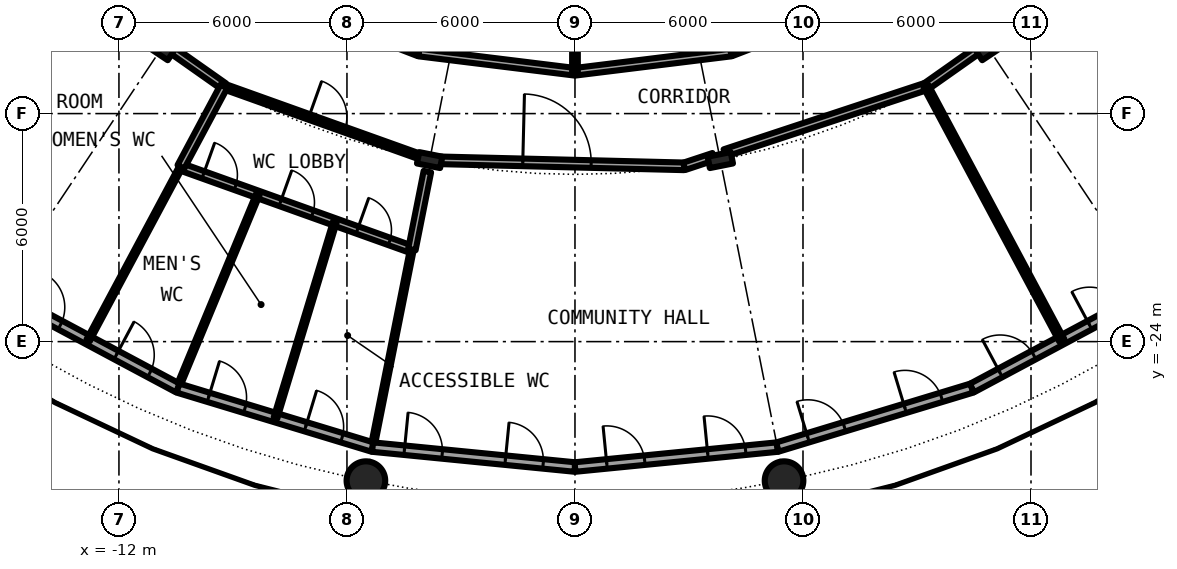
"""IFC4 building model, lengths in metres.
Left out: names, types, materials, properties, quantities, classifications, styles, units other than length and angle.
Written with IfcOpenShell. Run it as: python <this file> out.ifc"""

import sys

from ifc_helpers import new_model, si_unit, direction, frame, frame_2d, origin, origin_2d, place, context, subcontext, project, spatial, rectangle, hollow_circle, i_section, extrude, element, fill, save


model = new_model("IFC4")
c1 = context("Model", 3, precision=1e-05, world=origin(), true_north=direction((0.0, 1.0)))
c2 = subcontext(c1, "Body", "Model", "MODEL_VIEW")
j1 = project(units=[si_unit("LENGTHUNIT", "METRE"), si_unit("PLANEANGLEUNIT", "RADIAN")], contexts=[c1])
p1 = place(None, origin())
s1 = spatial("IfcSite", under=j1, at=p1, CompositionType="ELEMENT")
p2 = place(p1, origin())
s2 = spatial("IfcBuilding", under=s1, at=p2, CompositionType="ELEMENT")
p3 = place(p2, frame((0.0, 0.0, 53.3)))
s3 = spatial("IfcBuildingStorey", under=s2, at=p3, CompositionType="ELEMENT", Elevation=53.3)
for number, where, z_axis, x_axis in (
    (1, (-5.501, -27.658, 0.0), (0.0, 0.0, 1.0), (1.0, 0.0, 0.0)),
    (2, (5.501, -27.658, 0.0), (0.0, 0.0, 1.0), (1.0, 0.0, 0.0)),
):
    element("IfcColumn", number, at=place(p3, frame(where, z_axis=z_axis, x_axis=x_axis)), inside=s3, PredefinedType="COLUMN", context=c2, shape_type="SweptSolid", body=[
        extrude(hollow_circle(Radius=0.508, WallThickness=0.05, at=origin_2d()), origin(), (0.0, 0.0, 1.0), 4.2),
    ])
for number, where, z_axis, x_axis in (
    (3, (-10.889, -16.297, 0.0), (0.0, 0.0, 1.0), (-0.556, -0.831, 0.0)),
    (4, (-3.824, -19.223, 0.0), (0.0, 0.0, 1.0), (-0.195, -0.981, 0.0)),
    (5, (3.824, -19.223, 0.0), (0.0, 0.0, 1.0), (0.195, -0.981, 0.0)),
    (6, (10.889, -16.297, 0.0), (0.0, 0.0, 1.0), (0.556, -0.831, 0.0)),
):
    element("IfcColumn", number, at=place(p3, frame(where, z_axis=z_axis, x_axis=x_axis)), inside=s3, PredefinedType="COLUMN", context=c2, shape_type="SweptSolid", body=[
        extrude(i_section(OverallWidth=0.305, OverallDepth=0.62, WebThickness=0.021, FlangeThickness=0.04, FilletRadius=0.027, at=origin_2d()), origin(), (0.0, 0.0, 1.0), 4.2),
    ])
p4 = place(p3, frame((-15.167, -22.699, 0.0), z_axis=(0.0, 0.0, 1.0), x_axis=(0.881915646801, -0.471407246368, 0.0)))
e7 = element("IfcWall", 7, at=p4, inside=s3, PredefinedType="SOLIDWALL", context=c2, shape_type="SweptSolid", body=[
    extrude(rectangle(XDim=5.352, YDim=0.25, at=frame_2d((2.676, 0.0))), origin(), (0.0, 0.0, 1.0), 3.8),
])
p5 = place(p4, frame((0.841, 0.0, 0.0)))
e8 = element("IfcOpeningElement", 8, at=p5, cuts=e7, PredefinedType="OPENING", context=c2, shape_type="SweptSolid", body=[
    extrude(rectangle(XDim=1.0, YDim=2.2, at=frame_2d((0.5, 1.1))), frame((0.0, 0.135, 0.0), z_axis=(0.0, -1.0, 0.0), x_axis=(1.0, 0.0, 0.0)), (0.0, 0.0, 1.0), 0.27),
])
p6 = place(p4, frame((3.51, 0.0, 0.0)))
e9 = element("IfcOpeningElement", 9, at=p6, cuts=e7, PredefinedType="OPENING", context=c2, shape_type="SweptSolid", body=[
    extrude(rectangle(XDim=1.0, YDim=2.2, at=frame_2d((0.5, 1.1))), frame((0.0, 0.135, 0.0), z_axis=(0.0, -1.0, 0.0), x_axis=(1.0, 0.0, 0.0)), (0.0, 0.0, 1.0), 0.27),
])
p7 = place(p3, frame((-10.447, -25.222, 0.0), z_axis=(0.0, 0.0, 1.0), x_axis=(0.956965678721, -0.290201119486, 0.0)))
e10 = element("IfcWall", 10, at=p7, inside=s3, PredefinedType="SOLIDWALL", context=c2, shape_type="SweptSolid", body=[
    extrude(rectangle(XDim=5.351, YDim=0.25, at=frame_2d((2.676, 0.0))), origin(), (0.0, 0.0, 1.0), 3.8),
])
p8 = place(p7, frame((0.841, 0.0, 0.0)))
e11 = element("IfcOpeningElement", 11, at=p8, cuts=e10, PredefinedType="OPENING", context=c2, shape_type="SweptSolid", body=[
    extrude(rectangle(XDim=1.0, YDim=2.2, at=frame_2d((0.5, 1.1))), frame((0.0, 0.135, 0.0), z_axis=(0.0, -1.0, 0.0), x_axis=(1.0, 0.0, 0.0)), (0.0, 0.0, 1.0), 0.27),
])
p9 = place(p7, frame((3.51, 0.0, 0.0)))
e12 = element("IfcOpeningElement", 12, at=p9, cuts=e10, PredefinedType="OPENING", context=c2, shape_type="SweptSolid", body=[
    extrude(rectangle(XDim=1.0, YDim=2.2, at=frame_2d((0.5, 1.1))), frame((0.0, 0.135, 0.0), z_axis=(0.0, -1.0, 0.0), x_axis=(1.0, 0.0, 0.0)), (0.0, 0.0, 1.0), 0.27),
])
p10 = place(p3, frame((-5.326, -26.775, 0.0), z_axis=(0.0, 0.0, 1.0), x_axis=(0.995173996315, -0.098126026407, 0.0)))
e13 = element("IfcWall", 13, at=p10, inside=s3, PredefinedType="SOLIDWALL", context=c2, shape_type="SweptSolid", body=[
    extrude(rectangle(XDim=5.352, YDim=0.25, at=frame_2d((2.676, 0.0))), origin(), (0.0, 0.0, 1.0), 3.8),
])
p11 = place(p10, frame((0.841, 0.0, 0.0)))
e14 = element("IfcOpeningElement", 14, at=p11, cuts=e13, PredefinedType="OPENING", context=c2, shape_type="SweptSolid", body=[
    extrude(rectangle(XDim=1.0, YDim=2.2, at=frame_2d((0.5, 1.1))), frame((0.0, 0.135, 0.0), z_axis=(0.0, -1.0, 0.0), x_axis=(1.0, 0.0, 0.0)), (0.0, 0.0, 1.0), 0.27),
])
p12 = place(p10, frame((3.51, 0.0, 0.0)))
e15 = element("IfcOpeningElement", 15, at=p12, cuts=e13, PredefinedType="OPENING", context=c2, shape_type="SweptSolid", body=[
    extrude(rectangle(XDim=1.0, YDim=2.2, at=frame_2d((0.5, 1.1))), frame((0.0, 0.135, 0.0), z_axis=(0.0, -1.0, 0.0), x_axis=(1.0, 0.0, 0.0)), (0.0, 0.0, 1.0), 0.27),
])
p13 = place(p3, frame((0.0, -27.3, 0.0), z_axis=(0.0, 0.0, 1.0), x_axis=(0.995173996315, 0.098126026407, 0.0)))
e16 = element("IfcWall", 16, at=p13, inside=s3, PredefinedType="SOLIDWALL", context=c2, shape_type="SweptSolid", body=[
    extrude(rectangle(XDim=5.352, YDim=0.25, at=frame_2d((2.676, 0.0))), origin(), (0.0, 0.0, 1.0), 3.8),
])
p14 = place(p13, frame((0.841, 0.0, 0.0)))
e17 = element("IfcOpeningElement", 17, at=p14, cuts=e16, PredefinedType="OPENING", context=c2, shape_type="SweptSolid", body=[
    extrude(rectangle(XDim=1.0, YDim=2.2, at=frame_2d((0.5, 1.1))), frame((0.0, 0.135, 0.0), z_axis=(0.0, -1.0, 0.0), x_axis=(1.0, 0.0, 0.0)), (0.0, 0.0, 1.0), 0.27),
])
p15 = place(p13, frame((3.51, 0.0, 0.0)))
e18 = element("IfcOpeningElement", 18, at=p15, cuts=e16, PredefinedType="OPENING", context=c2, shape_type="SweptSolid", body=[
    extrude(rectangle(XDim=1.0, YDim=2.2, at=frame_2d((0.5, 1.1))), frame((0.0, 0.135, 0.0), z_axis=(0.0, -1.0, 0.0), x_axis=(1.0, 0.0, 0.0)), (0.0, 0.0, 1.0), 0.27),
])
p16 = place(p3, frame((5.326, -26.775, 0.0), z_axis=(0.0, 0.0, 1.0), x_axis=(0.956965678721, 0.290201119486, 0.0)))
e19 = element("IfcWall", 19, at=p16, inside=s3, PredefinedType="SOLIDWALL", context=c2, shape_type="SweptSolid", body=[
    extrude(rectangle(XDim=5.351, YDim=0.25, at=frame_2d((2.676, 0.0))), origin(), (0.0, 0.0, 1.0), 3.8),
])
p17 = place(p16, frame((0.841, 0.0, 0.0)))
e20 = element("IfcOpeningElement", 20, at=p17, cuts=e19, PredefinedType="OPENING", context=c2, shape_type="SweptSolid", body=[
    extrude(rectangle(XDim=1.0, YDim=2.2, at=frame_2d((0.5, 1.1))), frame((0.0, 0.135, 0.0), z_axis=(0.0, -1.0, 0.0), x_axis=(1.0, 0.0, 0.0)), (0.0, 0.0, 1.0), 0.27),
])
p18 = place(p16, frame((3.51, 0.0, 0.0)))
e21 = element("IfcOpeningElement", 21, at=p18, cuts=e19, PredefinedType="OPENING", context=c2, shape_type="SweptSolid", body=[
    extrude(rectangle(XDim=1.0, YDim=2.2, at=frame_2d((0.5, 1.1))), frame((0.0, 0.135, 0.0), z_axis=(0.0, -1.0, 0.0), x_axis=(1.0, 0.0, 0.0)), (0.0, 0.0, 1.0), 0.27),
])
p19 = place(p3, frame((10.447, -25.222, 0.0), z_axis=(0.0, 0.0, 1.0), x_axis=(0.881915646801, 0.471407246368, 0.0)))
e22 = element("IfcWall", 22, at=p19, inside=s3, PredefinedType="SOLIDWALL", context=c2, shape_type="SweptSolid", body=[
    extrude(rectangle(XDim=5.352, YDim=0.25, at=frame_2d((2.676, 0.0))), origin(), (0.0, 0.0, 1.0), 3.8),
])
p20 = place(p19, frame((0.841, 0.0, 0.0)))
e23 = element("IfcOpeningElement", 23, at=p20, cuts=e22, PredefinedType="OPENING", context=c2, shape_type="SweptSolid", body=[
    extrude(rectangle(XDim=1.0, YDim=2.2, at=frame_2d((0.5, 1.1))), frame((0.0, 0.135, 0.0), z_axis=(0.0, -1.0, 0.0), x_axis=(1.0, 0.0, 0.0)), (0.0, 0.0, 1.0), 0.27),
])
p21 = place(p19, frame((3.51, 0.0, 0.0)))
e24 = element("IfcOpeningElement", 24, at=p21, cuts=e22, PredefinedType="OPENING", context=c2, shape_type="SweptSolid", body=[
    extrude(rectangle(XDim=1.0, YDim=2.2, at=frame_2d((0.5, 1.1))), frame((0.0, 0.135, 0.0), z_axis=(0.0, -1.0, 0.0), x_axis=(1.0, 0.0, 0.0)), (0.0, 0.0, 1.0), 0.27),
])
p22 = place(p3, frame((-10.373, -19.401, 0.0), z_axis=(0.0, 0.0, 1.0), x_axis=(0.941534771306, -0.336915826909, 0.0)))
e25 = element("IfcWall", 25, at=p22, inside=s3, PredefinedType="PARTITIONING", context=c2, shape_type="SweptSolid", body=[
    extrude(rectangle(XDim=6.459, YDim=0.2, at=frame_2d((3.229, 0.0))), origin(), (0.0, 0.0, 1.0), 3.8),
])
p23 = place(p22, frame((0.627, 0.0, 0.0)))
e26 = element("IfcOpeningElement", 26, at=p23, cuts=e25, PredefinedType="OPENING", context=c2, shape_type="SweptSolid", body=[
    extrude(rectangle(XDim=0.9, YDim=2.3, at=frame_2d((0.45, 1.15))), frame((0.0, 0.11, 0.0), z_axis=(0.0, -1.0, 0.0), x_axis=(1.0, 0.0, 0.0)), (0.0, 0.0, 1.0), 0.22),
])
p24 = place(p22, frame((2.781, 0.0, 0.0)))
e27 = element("IfcOpeningElement", 27, at=p24, cuts=e25, PredefinedType="OPENING", context=c2, shape_type="SweptSolid", body=[
    extrude(rectangle(XDim=0.9, YDim=2.3, at=frame_2d((0.45, 1.15))), frame((0.0, 0.11, 0.0), z_axis=(0.0, -1.0, 0.0), x_axis=(1.0, 0.0, 0.0)), (0.0, 0.0, 1.0), 0.22),
])
p25 = place(p22, frame((4.933, 0.0, 0.0)))
e28 = element("IfcOpeningElement", 28, at=p25, cuts=e25, PredefinedType="OPENING", context=c2, shape_type="SweptSolid", body=[
    extrude(rectangle(XDim=0.9, YDim=2.3, at=frame_2d((0.45, 1.15))), frame((0.0, 0.11, 0.0), z_axis=(0.0, -1.0, 0.0), x_axis=(1.0, 0.0, 0.0)), (0.0, 0.0, 1.0), 0.22),
])
for number, where, z_axis, x_axis in (
    (29, (-10.686, -16.267, 0.0), (0.0, 0.0, 1.0), (0.818, -0.576, 0.0)),
    (30, (9.239, -17.286, 0.0), (0.0, 0.0, 1.0), (0.818, 0.576, 0.0)),
):
    element("IfcWall", number, at=place(p3, frame(where, z_axis=z_axis, x_axis=x_axis)), inside=s3, PredefinedType="PARTITIONING", context=c2, shape_type="SweptSolid", body=[
        extrude(rectangle(XDim=1.77, YDim=0.2, at=frame_2d((0.885, 0.0))), origin(), (0.0, 0.0, 1.0), 3.48),
    ])
p26 = place(p3, frame((-9.239, -17.286, 0.0), z_axis=(0.0, 0.0, 1.0), x_axis=(0.94157995483, -0.336789531699, 0.0)))
e31 = element("IfcWall", 31, at=p26, inside=s3, PredefinedType="PARTITIONING", context=c2, shape_type="SweptSolid", body=[
    extrude(rectangle(XDim=5.597, YDim=0.15, at=frame_2d((2.798, 0.0))), origin(), (0.0, 0.0, 1.0), 3.48),
])
p27 = place(p26, frame((2.376, 0.0, 0.0)))
e32 = element("IfcOpeningElement", 32, at=p27, cuts=e31, PredefinedType="OPENING", context=c2, shape_type="SweptSolid", body=[
    extrude(rectangle(XDim=1.0, YDim=2.3, at=frame_2d((0.5, 1.15))), frame((0.0, 0.085, 0.0), z_axis=(0.0, -1.0, 0.0), x_axis=(1.0, 0.0, 0.0)), (0.0, 0.0, 1.0), 0.17),
])
p28 = place(p3, frame((-3.669, -19.227, 0.0), z_axis=(0.0, 0.0, 1.0), x_axis=(0.999697994237, -0.024574790294, 0.0)))
e33 = element("IfcWall", 33, at=p28, inside=s3, PredefinedType="PARTITIONING", context=c2, shape_type="SweptSolid", body=[
    extrude(rectangle(XDim=6.547, YDim=0.2, at=frame_2d((3.273, 0.0))), origin(), (0.0, 0.0, 1.0), 3.48),
])
p29 = place(p28, frame((2.296, 0.0, 0.0)))
e34 = element("IfcOpeningElement", 34, at=p29, cuts=e33, PredefinedType="OPENING", context=c2, shape_type="SweptSolid", body=[
    extrude(rectangle(XDim=1.8, YDim=2.3, at=frame_2d((0.9, 1.15))), frame((0.0, 0.11, 0.0), z_axis=(0.0, -1.0, 0.0), x_axis=(1.0, 0.0, 0.0)), (0.0, 0.0, 1.0), 0.22),
])
p30 = place(p3, frame((2.876, -19.388, 0.0), z_axis=(0.0, 0.0, 1.0), x_axis=(0.949459157713, 0.313890598512, 0.0)))
e35 = element("IfcWall", 35, at=p30, inside=s3, PredefinedType="PARTITIONING", context=c2, shape_type="SweptSolid", body=[
    extrude(rectangle(XDim=0.815, YDim=0.2, at=frame_2d((0.408, 0.0))), origin(), (0.0, 0.0, 1.0), 3.8),
])
p31 = place(p3, frame((3.942, -19.036, 0.0), z_axis=(0.0, 0.0, 1.0), x_axis=(0.949524538902, 0.313692763739, 0.0)))
e36 = element("IfcWall", 36, at=p31, inside=s3, PredefinedType="PARTITIONING", context=c2, shape_type="SweptSolid", body=[
    extrude(rectangle(XDim=5.579, YDim=0.2, at=frame_2d((2.789, 0.0))), origin(), (0.0, 0.0, 1.0), 3.48),
])
p32 = place(p3, frame((-7.967, -14.904, 0.0), z_axis=(0.0, 0.0, 1.0), x_axis=(0.932943640288, -0.360022449363, 0.0)))
e37 = element("IfcWall", 37, at=p32, inside=s3, PredefinedType="PARTITIONING", context=c2, shape_type="SweptSolid", body=[
    extrude(rectangle(XDim=4.139, YDim=0.2, at=frame_2d((2.069, 0.0))), origin(), (0.0, 0.0, 1.0), 3.8),
])
p33 = place(p32, frame((1.569, 0.0, 0.0)))
e38 = element("IfcOpeningElement", 38, at=p33, cuts=e37, PredefinedType="OPENING", context=c2, shape_type="SweptSolid", body=[
    extrude(rectangle(XDim=1.0, YDim=2.3, at=frame_2d((0.5, 1.15))), frame((0.0, 0.11, 0.0), z_axis=(0.0, -1.0, 0.0), x_axis=(1.0, 0.0, 0.0)), (0.0, 0.0, 1.0), 0.22),
])
for number, where, z_axis, x_axis in (
    (39, (-4.106, -16.394, 0.0), (0.0, 0.0, 1.0), (0.992, -0.122, 0.0)),
    (40, (0.0, -16.9, 0.0), (0.0, 0.0, 1.0), (0.992, 0.122, 0.0)),
):
    element("IfcWall", number, at=place(p3, frame(where, z_axis=z_axis, x_axis=x_axis)), inside=s3, PredefinedType="PARTITIONING", context=c2, shape_type="SweptSolid", body=[
        extrude(rectangle(XDim=4.137, YDim=0.2, at=frame_2d((2.068, 0.0))), origin(), (0.0, 0.0, 1.0), 3.8),
    ])
p34 = place(p3, frame((4.106, -16.394, 0.0), z_axis=(0.0, 0.0, 1.0), x_axis=(0.932943640288, 0.360022449363, 0.0)))
e41 = element("IfcWall", 41, at=p34, inside=s3, PredefinedType="PARTITIONING", context=c2, shape_type="SweptSolid", body=[
    extrude(rectangle(XDim=4.139, YDim=0.2, at=frame_2d((2.069, 0.0))), origin(), (0.0, 0.0, 1.0), 3.8),
])
p35 = place(p34, frame((1.569, 0.0, 0.0)))
e42 = element("IfcOpeningElement", 42, at=p35, cuts=e41, PredefinedType="OPENING", context=c2, shape_type="SweptSolid", body=[
    extrude(rectangle(XDim=1.0, YDim=2.3, at=frame_2d((0.5, 1.15))), frame((0.0, 0.11, 0.0), z_axis=(0.0, -1.0, 0.0), x_axis=(1.0, 0.0, 0.0)), (0.0, 0.0, 1.0), 0.22),
])
p36 = place(p3, frame((-12.81, -23.966, 0.0), z_axis=(0.0, 0.0, 1.0), x_axis=(0.471464572183, 0.88188500224, 0.0)))
e43 = element("IfcWall", 43, at=p36, inside=s3, PredefinedType="PARTITIONING", context=c2, shape_type="SweptSolid", body=[
    extrude(rectangle(XDim=5.175, YDim=0.1, at=frame_2d((2.588, 0.0))), origin(), (0.0, 0.0, 1.0), 3.8),
])
p37 = place(p3, frame((-10.407, -25.103, 0.0), z_axis=(0.0, 0.0, 1.0), x_axis=(0.382973519041, 0.923759321313, 0.0)))
e44 = element("IfcWall", 44, at=p37, inside=s3, PredefinedType="PARTITIONING", context=c2, shape_type="SweptSolid", body=[
    extrude(rectangle(XDim=5.387, YDim=0.1, at=frame_2d((2.693, 0.0))), origin(), (0.0, 0.0, 1.0), 3.8),
])
p38 = place(p3, frame((-10.37, -19.402, 0.0), z_axis=(0.0, 0.0, 1.0), x_axis=(0.471385457832, 0.881927293004, 0.0)))
e45 = element("IfcWall", 45, at=p38, inside=s3, PredefinedType="PARTITIONING", context=c2, shape_type="SweptSolid", body=[
    extrude(rectangle(XDim=2.399, YDim=0.2, at=frame_2d((1.2, 0.0))), origin(), (0.0, 0.0, 1.0), 3.8),
])
p39 = place(p3, frame((-7.88, -26.007, 0.0), z_axis=(0.0, 0.0, 1.0), x_axis=(0.289945753839, 0.957043081492, 0.0)))
e46 = element("IfcWall", 46, at=p39, inside=s3, PredefinedType="PARTITIONING", context=c2, shape_type="SweptSolid", body=[
    extrude(rectangle(XDim=5.386, YDim=0.1, at=frame_2d((2.693, 0.0))), origin(), (0.0, 0.0, 1.0), 3.8),
])
p40 = place(p3, frame((-5.302, -26.653, 0.0), z_axis=(0.0, 0.0, 1.0), x_axis=(0.19514541008, 0.980774321098, 0.0)))
e47 = element("IfcWall", 47, at=p40, inside=s3, PredefinedType="PARTITIONING", context=c2, shape_type="SweptSolid", body=[
    extrude(rectangle(XDim=5.176, YDim=0.1, at=frame_2d((2.588, 0.0))), origin(), (0.0, 0.0, 1.0), 3.8),
])
p41 = place(p3, frame((-4.292, -21.577, 0.0), z_axis=(0.0, 0.0, 1.0), x_axis=(0.195195020704, 0.98076444873, 0.0)))
e48 = element("IfcWall", 48, at=p41, inside=s3, PredefinedType="PARTITIONING", context=c2, shape_type="SweptSolid", body=[
    extrude(rectangle(XDim=2.09, YDim=0.2, at=frame_2d((1.045, 0.0))), origin(), (0.0, 0.0, 1.0), 3.8),
])
p42 = place(p3, frame((0.0, -16.9, 0.0), z_axis=(0.0, 0.0, 1.0), x_axis=(0.0, 1.0, 0.0)))
e49 = element("IfcWall", 49, at=p42, inside=s3, PredefinedType="PARTITIONING", context=c2, shape_type="SweptSolid", body=[
    extrude(rectangle(XDim=9.18, YDim=0.15, at=frame_2d((4.59, 0.0))), origin(), (0.0, 0.0, 1.0), 3.8),
])
p43 = place(p3, frame((9.239, -17.286, 0.0), z_axis=(0.0, 0.0, 1.0), x_axis=(0.471439510802, -0.881898399848, 0.0)))
e50 = element("IfcWall", 50, at=p43, inside=s3, PredefinedType="PARTITIONING", context=c2, shape_type="SweptSolid", body=[
    extrude(rectangle(XDim=7.575, YDim=0.15, at=frame_2d((3.787, 0.0))), origin(), (0.0, 0.0, 1.0), 3.8),
])
p44 = place(p5, origin())
e51 = element("IfcDoor", 51, at=p44, inside=s3, OperationType="SINGLE_SWING_LEFT", PredefinedType="DOOR", context=c2, shape_type="SweptSolid", body=[
    extrude(rectangle(XDim=1.0, YDim=2.2, at=frame_2d((0.5, 1.1))), frame((0.0, 0.025, 0.0), z_axis=(0.0, -1.0, 0.0), x_axis=(1.0, 0.0, 0.0)), (0.0, 0.0, 1.0), 0.05),
])
fill(e8, e51)
p45 = place(p6, origin())
e52 = element("IfcDoor", 52, at=p45, inside=s3, OperationType="SINGLE_SWING_LEFT", PredefinedType="DOOR", context=c2, shape_type="SweptSolid", body=[
    extrude(rectangle(XDim=1.0, YDim=2.2, at=frame_2d((0.5, 1.1))), frame((0.0, 0.025, 0.0), z_axis=(0.0, -1.0, 0.0), x_axis=(1.0, 0.0, 0.0)), (0.0, 0.0, 1.0), 0.05),
])
fill(e9, e52)
p46 = place(p8, origin())
e53 = element("IfcDoor", 53, at=p46, inside=s3, OperationType="SINGLE_SWING_LEFT", PredefinedType="DOOR", context=c2, shape_type="SweptSolid", body=[
    extrude(rectangle(XDim=1.0, YDim=2.2, at=frame_2d((0.5, 1.1))), frame((0.0, 0.025, 0.0), z_axis=(0.0, -1.0, 0.0), x_axis=(1.0, 0.0, 0.0)), (0.0, 0.0, 1.0), 0.05),
])
fill(e11, e53)
p47 = place(p9, origin())
e54 = element("IfcDoor", 54, at=p47, inside=s3, OperationType="SINGLE_SWING_LEFT", PredefinedType="DOOR", context=c2, shape_type="SweptSolid", body=[
    extrude(rectangle(XDim=1.0, YDim=2.2, at=frame_2d((0.5, 1.1))), frame((0.0, 0.025, 0.0), z_axis=(0.0, -1.0, 0.0), x_axis=(1.0, 0.0, 0.0)), (0.0, 0.0, 1.0), 0.05),
])
fill(e12, e54)
p48 = place(p11, origin())
e55 = element("IfcDoor", 55, at=p48, inside=s3, OperationType="SINGLE_SWING_LEFT", PredefinedType="DOOR", context=c2, shape_type="SweptSolid", body=[
    extrude(rectangle(XDim=1.0, YDim=2.2, at=frame_2d((0.5, 1.1))), frame((0.0, 0.025, 0.0), z_axis=(0.0, -1.0, 0.0), x_axis=(1.0, 0.0, 0.0)), (0.0, 0.0, 1.0), 0.05),
])
fill(e14, e55)
p49 = place(p12, origin())
e56 = element("IfcDoor", 56, at=p49, inside=s3, OperationType="SINGLE_SWING_LEFT", PredefinedType="DOOR", context=c2, shape_type="SweptSolid", body=[
    extrude(rectangle(XDim=1.0, YDim=2.2, at=frame_2d((0.5, 1.1))), frame((0.0, 0.025, 0.0), z_axis=(0.0, -1.0, 0.0), x_axis=(1.0, 0.0, 0.0)), (0.0, 0.0, 1.0), 0.05),
])
fill(e15, e56)
p50 = place(p14, origin())
e57 = element("IfcDoor", 57, at=p50, inside=s3, OperationType="SINGLE_SWING_LEFT", PredefinedType="DOOR", context=c2, shape_type="SweptSolid", body=[
    extrude(rectangle(XDim=1.0, YDim=2.2, at=frame_2d((0.5, 1.1))), frame((0.0, 0.025, 0.0), z_axis=(0.0, -1.0, 0.0), x_axis=(1.0, 0.0, 0.0)), (0.0, 0.0, 1.0), 0.05),
])
fill(e17, e57)
p51 = place(p15, origin())
e58 = element("IfcDoor", 58, at=p51, inside=s3, OperationType="SINGLE_SWING_LEFT", PredefinedType="DOOR", context=c2, shape_type="SweptSolid", body=[
    extrude(rectangle(XDim=1.0, YDim=2.2, at=frame_2d((0.5, 1.1))), frame((0.0, 0.025, 0.0), z_axis=(0.0, -1.0, 0.0), x_axis=(1.0, 0.0, 0.0)), (0.0, 0.0, 1.0), 0.05),
])
fill(e18, e58)
p52 = place(p17, origin())
e59 = element("IfcDoor", 59, at=p52, inside=s3, OperationType="SINGLE_SWING_LEFT", PredefinedType="DOOR", context=c2, shape_type="SweptSolid", body=[
    extrude(rectangle(XDim=1.0, YDim=2.2, at=frame_2d((0.5, 1.1))), frame((0.0, 0.025, 0.0), z_axis=(0.0, -1.0, 0.0), x_axis=(1.0, 0.0, 0.0)), (0.0, 0.0, 1.0), 0.05),
])
fill(e20, e59)
p53 = place(p18, origin())
e60 = element("IfcDoor", 60, at=p53, inside=s3, OperationType="SINGLE_SWING_LEFT", PredefinedType="DOOR", context=c2, shape_type="SweptSolid", body=[
    extrude(rectangle(XDim=1.0, YDim=2.2, at=frame_2d((0.5, 1.1))), frame((0.0, 0.025, 0.0), z_axis=(0.0, -1.0, 0.0), x_axis=(1.0, 0.0, 0.0)), (0.0, 0.0, 1.0), 0.05),
])
fill(e21, e60)
p54 = place(p20, origin())
e61 = element("IfcDoor", 61, at=p54, inside=s3, OperationType="SINGLE_SWING_LEFT", PredefinedType="DOOR", context=c2, shape_type="SweptSolid", body=[
    extrude(rectangle(XDim=1.0, YDim=2.2, at=frame_2d((0.5, 1.1))), frame((0.0, 0.025, 0.0), z_axis=(0.0, -1.0, 0.0), x_axis=(1.0, 0.0, 0.0)), (0.0, 0.0, 1.0), 0.05),
])
fill(e23, e61)
p55 = place(p21, origin())
e62 = element("IfcDoor", 62, at=p55, inside=s3, OperationType="SINGLE_SWING_LEFT", PredefinedType="DOOR", context=c2, shape_type="SweptSolid", body=[
    extrude(rectangle(XDim=1.0, YDim=2.2, at=frame_2d((0.5, 1.1))), frame((0.0, 0.025, 0.0), z_axis=(0.0, -1.0, 0.0), x_axis=(1.0, 0.0, 0.0)), (0.0, 0.0, 1.0), 0.05),
])
fill(e24, e62)
p56 = place(p27, origin())
e63 = element("IfcDoor", 63, at=p56, inside=s3, OperationType="SINGLE_SWING_RIGHT", PredefinedType="DOOR", context=c2, shape_type="SweptSolid", body=[
    extrude(rectangle(XDim=1.0, YDim=2.3, at=frame_2d((0.5, 1.15))), frame((0.0, 0.025, 0.0), z_axis=(0.0, -1.0, 0.0), x_axis=(1.0, 0.0, 0.0)), (0.0, 0.0, 1.0), 0.05),
])
fill(e32, e63)
p57 = place(p23, origin())
e64 = element("IfcDoor", 64, at=p57, inside=s3, OperationType="SINGLE_SWING_LEFT", PredefinedType="DOOR", context=c2, shape_type="SweptSolid", body=[
    extrude(rectangle(XDim=0.9, YDim=2.3, at=frame_2d((0.45, 1.15))), frame((0.0, 0.025, 0.0), z_axis=(0.0, -1.0, 0.0), x_axis=(1.0, 0.0, 0.0)), (0.0, 0.0, 1.0), 0.05),
])
fill(e26, e64)
p58 = place(p24, origin())
e65 = element("IfcDoor", 65, at=p58, inside=s3, OperationType="SINGLE_SWING_RIGHT", PredefinedType="DOOR", context=c2, shape_type="SweptSolid", body=[
    extrude(rectangle(XDim=0.9, YDim=2.3, at=frame_2d((0.45, 1.15))), frame((0.0, 0.025, 0.0), z_axis=(0.0, -1.0, 0.0), x_axis=(1.0, 0.0, 0.0)), (0.0, 0.0, 1.0), 0.05),
])
fill(e27, e65)
p59 = place(p25, origin())
e66 = element("IfcDoor", 66, at=p59, inside=s3, OperationType="SINGLE_SWING_RIGHT", PredefinedType="DOOR", context=c2, shape_type="SweptSolid", body=[
    extrude(rectangle(XDim=0.9, YDim=2.3, at=frame_2d((0.45, 1.15))), frame((0.0, 0.025, 0.0), z_axis=(0.0, -1.0, 0.0), x_axis=(1.0, 0.0, 0.0)), (0.0, 0.0, 1.0), 0.05),
])
fill(e28, e66)
p60 = place(p29, origin())
e67 = element("IfcDoor", 67, at=p60, inside=s3, OperationType="DOUBLE_DOOR_SINGLE_SWING", PredefinedType="DOOR", context=c2, shape_type="SweptSolid", body=[
    extrude(rectangle(XDim=1.8, YDim=2.3, at=frame_2d((0.9, 1.15))), frame((0.0, 0.025, 0.0), z_axis=(0.0, -1.0, 0.0), x_axis=(1.0, 0.0, 0.0)), (0.0, 0.0, 1.0), 0.05),
])
fill(e34, e67)
save(model, sys.argv[1])
